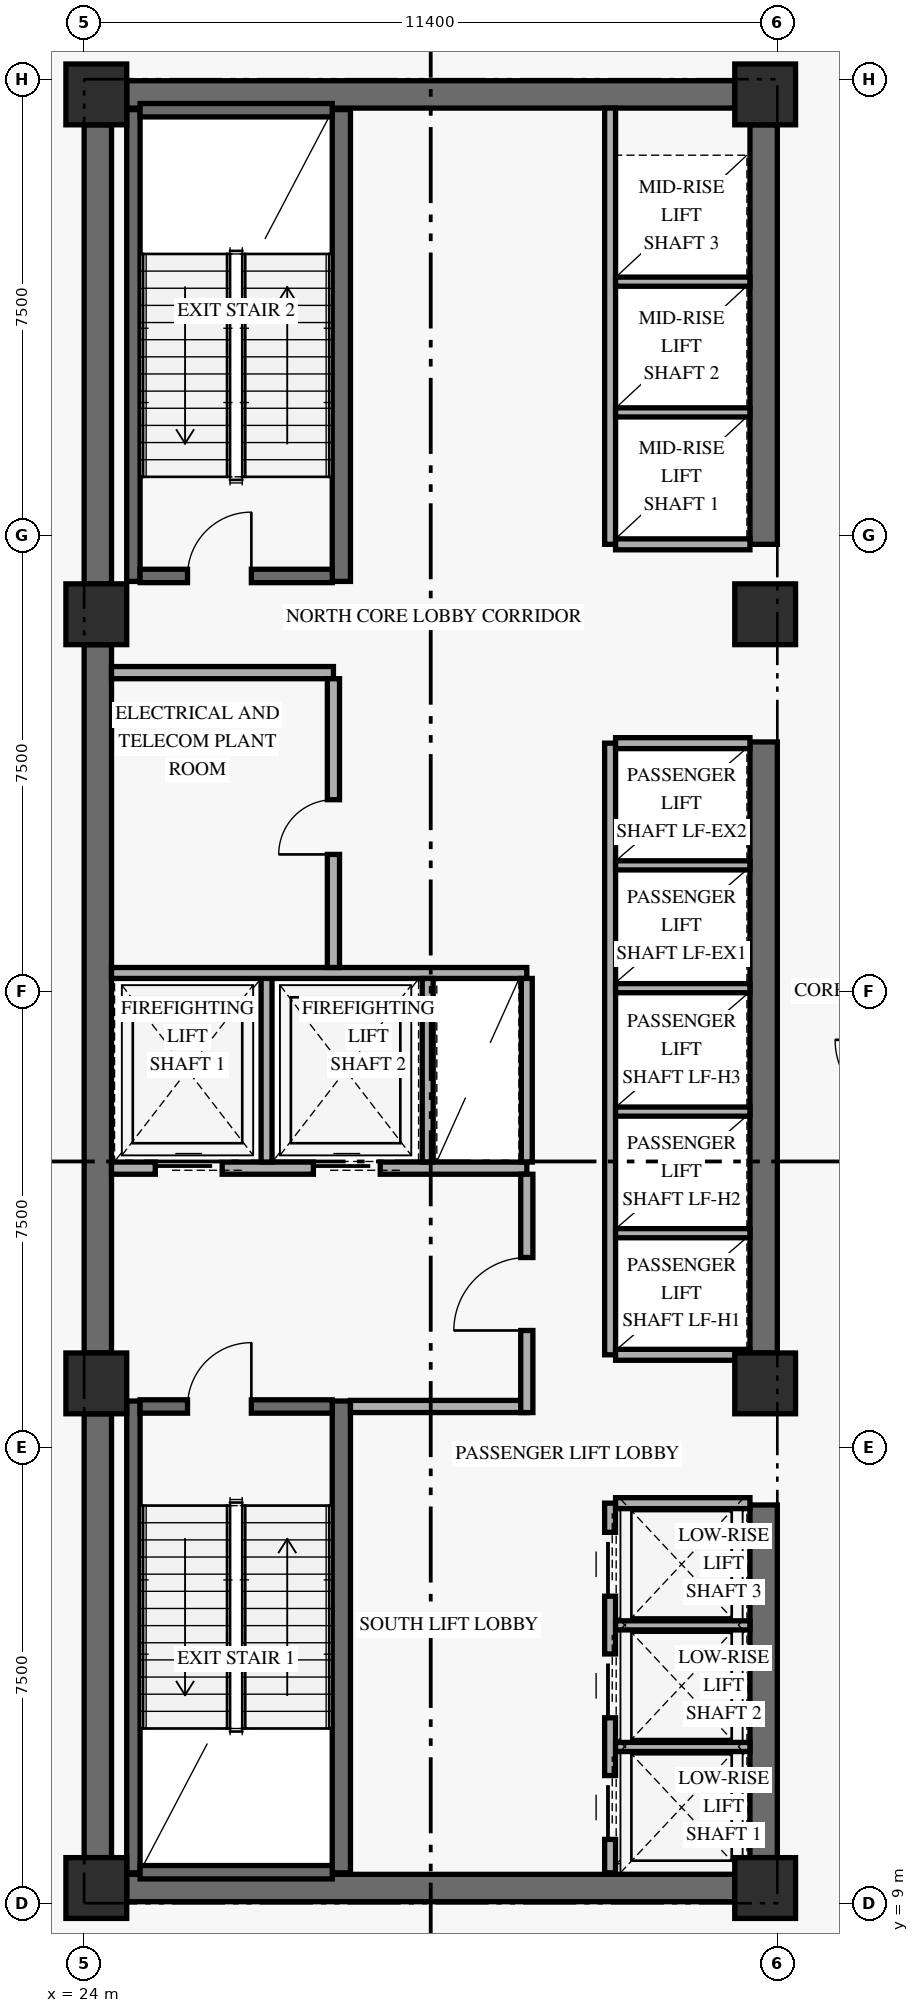
"""IFC4 building model, lengths in metres.
Left out: names, types, materials, properties, quantities, classifications, styles, units other than length and angle.
Written with IfcOpenShell. Run it as: python <this file> out.ifc"""

import sys

from ifc_helpers import new_model, si_unit, direction, frame, frame_2d, origin, origin_2d, place, context, subcontext, project, spatial, rectangle, extrude, element, fill, save


model = new_model("IFC4")
c1 = context("Model", 3, precision=1e-05, world=origin(), true_north=direction((0.0, 1.0)))
c2 = subcontext(c1, "Body", "Model", "MODEL_VIEW")
j1 = project(units=[si_unit("LENGTHUNIT", "METRE"), si_unit("PLANEANGLEUNIT", "RADIAN")], contexts=[c1])
p1 = place(None, origin())
s1 = spatial("IfcSite", under=j1, at=p1, CompositionType="ELEMENT")
p2 = place(p1, origin())
s2 = spatial("IfcBuilding", under=s1, at=p2, CompositionType="ELEMENT")
p3 = place(p2, frame((0.0, 0.0, 4.8)))
s3 = spatial("IfcBuildingStorey", under=s2, at=p3, CompositionType="ELEMENT", Elevation=4.8)
p4 = place(p3, frame((24.225, 9.75, 0.0), z_axis=(0.0, 0.0, 1.0), x_axis=(0.0, 1.0, 0.0)))
e1 = element("IfcWall", 1, at=p4, inside=s3, PredefinedType="SHEAR", context=c2, shape_type="SweptSolid", body=[
    extrude(rectangle(XDim=7.3, YDim=0.45, at=frame_2d((3.65, 0.0))), origin(), (0.0, 0.0, 1.0), 3.75),
])
p5 = place(p3, frame((24.225, 18.05, 0.0), z_axis=(0.0, 0.0, 1.0), x_axis=(0.0, 1.0, 0.0)))
e2 = element("IfcWall", 2, at=p5, inside=s3, PredefinedType="SHEAR", context=c2, shape_type="SweptSolid", body=[
    extrude(rectangle(XDim=11.65, YDim=0.45, at=frame_2d((5.825, 0.0))), origin(), (0.0, 0.0, 1.0), 3.75),
])
p6 = place(p3, frame((24.225, 30.7, 0.0), z_axis=(0.0, 0.0, 1.0), x_axis=(0.0, 1.0, 0.0)))
e3 = element("IfcWall", 3, at=p6, inside=s3, PredefinedType="SHEAR", context=c2, shape_type="SweptSolid", body=[
    extrude(rectangle(XDim=7.55, YDim=0.45, at=frame_2d((3.775, 0.0))), origin(), (0.0, 0.0, 1.0), 3.75),
])
p7 = place(p3, frame((35.175, 9.75, 0.0), z_axis=(0.0, 0.0, 1.0), x_axis=(0.0, 1.0, 0.0)))
e4 = element("IfcWall", 4, at=p7, inside=s3, PredefinedType="SHEAR", context=c2, shape_type="SweptSolid", body=[
    extrude(rectangle(XDim=5.8, YDim=0.45, at=frame_2d((2.9, 0.0))), origin(), (0.0, 0.0, 1.0), 3.75),
])
p8 = place(p3, frame((35.175, 18.05, 0.0), z_axis=(0.0, 0.0, 1.0), x_axis=(0.0, 1.0, 0.0)))
e5 = element("IfcWall", 5, at=p8, inside=s3, PredefinedType="SHEAR", context=c2, shape_type="SweptSolid", body=[
    extrude(rectangle(XDim=10.05, YDim=0.45, at=frame_2d((5.025, 0.0))), origin(), (0.0, 0.0, 1.0), 3.75),
])
p9 = place(p3, frame((35.175, 31.35, 0.0), z_axis=(0.0, 0.0, 1.0), x_axis=(0.0, 1.0, 0.0)))
e6 = element("IfcWall", 6, at=p9, inside=s3, PredefinedType="SHEAR", context=c2, shape_type="SweptSolid", body=[
    extrude(rectangle(XDim=6.9, YDim=0.45, at=frame_2d((3.45, 0.0))), origin(), (0.0, 0.0, 1.0), 3.75),
])
for number, where, z_axis, x_axis in (
    (7, (24.7, 9.25, 0.0), (0.0, 0.0, 1.0), (1.0, 0.0, 0.0)),
    (8, (24.7, 38.75, 0.0), (0.0, 0.0, 1.0), (1.0, 0.0, 0.0)),
):
    element("IfcWall", number, at=place(p3, frame(where, z_axis=z_axis, x_axis=x_axis)), inside=s3, PredefinedType="SHEAR", context=c2, shape_type="SweptSolid", body=[
        extrude(rectangle(XDim=10.0, YDim=0.45, at=frame_2d((5.0, 0.0))), origin(), (0.0, 0.0, 1.0), 4.52),
    ])
p10 = place(p3, frame((24.81, 9.5, 0.0), z_axis=(0.0, 0.0, 1.0), x_axis=(0.0, 1.0, 0.0)))
e9 = element("IfcWall", 9, at=p10, inside=s3, PredefinedType="SHEAR", context=c2, shape_type="SweptSolid", body=[
    extrude(rectangle(XDim=7.76, YDim=0.22, at=frame_2d((3.88, 0.0))), origin(), (0.0, 0.0, 1.0), 4.52),
])
p11 = place(p3, frame((28.23, 9.5, 0.0), z_axis=(0.0, 0.0, 1.0), x_axis=(0.0, 1.0, 0.0)))
e10 = element("IfcWall", 10, at=p11, inside=s3, PredefinedType="SHEAR", context=c2, shape_type="SweptSolid", body=[
    extrude(rectangle(XDim=7.76, YDim=0.3, at=frame_2d((3.88, 0.0))), origin(), (0.0, 0.0, 1.0), 4.52),
])
p12 = place(p3, frame((24.92, 9.51, 0.0), z_axis=(0.0, 0.0, 1.0), x_axis=(1.0, 0.0, 0.0)))
e11 = element("IfcWall", 11, at=p12, inside=s3, PredefinedType="SHEAR", context=c2, shape_type="SweptSolid", body=[
    extrude(rectangle(XDim=3.16, YDim=0.22, at=frame_2d((1.58, 0.0))), origin(), (0.0, 0.0, 1.0), 4.52),
])
p13 = place(p3, frame((24.92, 17.17, 0.0), z_axis=(0.0, 0.0, 1.0), x_axis=(1.0, 0.0, 0.0)))
e12 = element("IfcWall", 12, at=p13, inside=s3, PredefinedType="SHEAR", context=c2, shape_type="SweptSolid", body=[
    extrude(rectangle(XDim=3.16, YDim=0.22, at=frame_2d((1.58, 0.0))), origin(), (0.0, 0.0, 1.0), 4.52),
])
p14 = place(p13, frame((0.78, 0.0, 0.0)))
e13 = element("IfcOpeningElement", 13, at=p14, cuts=e12, PredefinedType="OPENING", context=c2, shape_type="SweptSolid", body=[
    extrude(rectangle(XDim=1.05, YDim=2.15, at=frame_2d((0.525, 1.075))), frame((0.0, 0.12, 0.0), z_axis=(0.0, -1.0, 0.0), x_axis=(1.0, 0.0, 0.0)), (0.0, 0.0, 1.0), 0.24),
])
p15 = place(p3, frame((24.81, 30.74, 0.0), z_axis=(0.0, 0.0, 1.0), x_axis=(0.0, 1.0, 0.0)))
e14 = element("IfcWall", 14, at=p15, inside=s3, PredefinedType="SHEAR", context=c2, shape_type="SweptSolid", body=[
    extrude(rectangle(XDim=7.76, YDim=0.22, at=frame_2d((3.88, 0.0))), origin(), (0.0, 0.0, 1.0), 4.52),
])
p16 = place(p3, frame((28.23, 30.74, 0.0), z_axis=(0.0, 0.0, 1.0), x_axis=(0.0, 1.0, 0.0)))
e15 = element("IfcWall", 15, at=p16, inside=s3, PredefinedType="SHEAR", context=c2, shape_type="SweptSolid", body=[
    extrude(rectangle(XDim=7.76, YDim=0.3, at=frame_2d((3.88, 0.0))), origin(), (0.0, 0.0, 1.0), 4.52),
])
p17 = place(p3, frame((24.92, 30.83, 0.0), z_axis=(0.0, 0.0, 1.0), x_axis=(1.0, 0.0, 0.0)))
e16 = element("IfcWall", 16, at=p17, inside=s3, PredefinedType="SHEAR", context=c2, shape_type="SweptSolid", body=[
    extrude(rectangle(XDim=3.16, YDim=0.22, at=frame_2d((1.58, 0.0))), origin(), (0.0, 0.0, 1.0), 4.52),
])
p18 = place(p17, frame((0.78, 0.0, 0.0)))
e17 = element("IfcOpeningElement", 17, at=p18, cuts=e16, PredefinedType="OPENING", context=c2, shape_type="SweptSolid", body=[
    extrude(rectangle(XDim=1.05, YDim=2.15, at=frame_2d((0.525, 1.075))), frame((0.0, 0.12, 0.0), z_axis=(0.0, -1.0, 0.0), x_axis=(1.0, 0.0, 0.0)), (0.0, 0.0, 1.0), 0.24),
])
p19 = place(p3, frame((24.92, 38.49, 0.0), z_axis=(0.0, 0.0, 1.0), x_axis=(1.0, 0.0, 0.0)))
e18 = element("IfcWall", 18, at=p19, inside=s3, PredefinedType="SHEAR", context=c2, shape_type="SweptSolid", body=[
    extrude(rectangle(XDim=3.16, YDim=0.22, at=frame_2d((1.58, 0.0))), origin(), (0.0, 0.0, 1.0), 4.52),
])
for number, where, z_axis, x_axis in (
    (19, (24.2, 9.25, 0.0), (0.0, 0.0, 1.0), (1.0, 0.0, 0.0)),
    (20, (24.2, 17.55, 0.0), (0.0, 0.0, 1.0), (1.0, 0.0, 0.0)),
    (21, (24.2, 30.2, 0.0), (0.0, 0.0, 1.0), (1.0, 0.0, 0.0)),
    (22, (24.2, 38.75, 0.0), (0.0, 0.0, 1.0), (1.0, 0.0, 0.0)),
    (23, (35.2, 9.25, 0.0), (0.0, 0.0, 1.0), (1.0, 0.0, 0.0)),
    (24, (35.2, 17.55, 0.0), (0.0, 0.0, 1.0), (1.0, 0.0, 0.0)),
    (25, (35.2, 30.2, 0.0), (0.0, 0.0, 1.0), (1.0, 0.0, 0.0)),
    (26, (35.2, 38.75, 0.0), (0.0, 0.0, 1.0), (1.0, 0.0, 0.0)),
):
    element("IfcColumn", number, at=place(p3, frame(where, z_axis=z_axis, x_axis=x_axis)), inside=s3, PredefinedType="COLUMN", context=c2, shape_type="SweptSolid", body=[
        extrude(rectangle(XDim=1.0, YDim=1.0, at=origin_2d()), origin(), (0.0, 0.0, 1.0), 4.8),
    ])
p20 = place(p3, frame((24.45, 21.09, 0.0), z_axis=(0.0, 0.0, 1.0), x_axis=(1.0, 0.0, 0.0)))
e27 = element("IfcWall", 27, at=p20, inside=s3, PredefinedType="STANDARD", context=c2, shape_type="SweptSolid", body=[
    extrude(rectangle(XDim=6.83, YDim=0.2, at=frame_2d((3.415, 0.0))), origin(), (0.0, 0.0, 1.0), 4.52),
])
p21 = place(p20, frame((0.72, 0.0, 0.0)))
e28 = element("IfcOpeningElement", 28, at=p21, cuts=e27, PredefinedType="OPENING", context=c2, shape_type="SweptSolid", body=[
    extrude(rectangle(XDim=1.1, YDim=2.2, at=frame_2d((0.55, 1.1))), frame((0.0, 0.11, 0.0), z_axis=(0.0, -1.0, 0.0), x_axis=(1.0, 0.0, 0.0)), (0.0, 0.0, 1.0), 0.22),
])
p22 = place(p20, frame((3.32, 0.0, 0.0)))
e29 = element("IfcOpeningElement", 29, at=p22, cuts=e27, PredefinedType="OPENING", context=c2, shape_type="SweptSolid", body=[
    extrude(rectangle(XDim=1.1, YDim=2.2, at=frame_2d((0.55, 1.1))), frame((0.0, 0.11, 0.0), z_axis=(0.0, -1.0, 0.0), x_axis=(1.0, 0.0, 0.0)), (0.0, 0.0, 1.0), 0.22),
])
p23 = place(p3, frame((28.38, 17.17, 0.0), z_axis=(0.0, 0.0, 1.0), x_axis=(1.0, 0.0, 0.0)))
e30 = element("IfcWall", 30, at=p23, inside=s3, PredefinedType="STANDARD", context=c2, shape_type="SweptSolid", body=[
    extrude(rectangle(XDim=2.9, YDim=0.2, at=frame_2d((1.45, 0.0))), origin(), (0.0, 0.0, 1.0), 4.52),
])
p24 = place(p3, frame((31.28, 17.07, 0.0), z_axis=(0.0, 0.0, 1.0), x_axis=(0.0, 1.0, 0.0)))
e31 = element("IfcWall", 31, at=p24, inside=s3, PredefinedType="STANDARD", context=c2, shape_type="SweptSolid", body=[
    extrude(rectangle(XDim=3.92, YDim=0.2, at=frame_2d((1.96, 0.0))), origin(), (0.0, 0.0, 1.0), 3.502),
])
p25 = place(p24, frame((1.35, 0.0, 0.0)))
e32 = element("IfcOpeningElement", 32, at=p25, cuts=e31, PredefinedType="OPENING", context=c2, shape_type="SweptSolid", body=[
    extrude(rectangle(XDim=1.2, YDim=2.15, at=frame_2d((0.6, 1.075))), frame((0.0, 0.11, 0.0), z_axis=(0.0, -1.0, 0.0), x_axis=(1.0, 0.0, 0.0)), (0.0, 0.0, 1.0), 0.22),
])
p26 = place(p3, frame((27.0, 21.19, 0.0), z_axis=(0.0, 0.0, 1.0), x_axis=(0.0, 1.0, 0.0)))
e33 = element("IfcWall", 33, at=p26, inside=s3, PredefinedType="STANDARD", context=c2, shape_type="SweptSolid", body=[
    extrude(rectangle(XDim=3.11, YDim=0.18, at=frame_2d((1.555, 0.0))), origin(), (0.0, 0.0, 1.0), 4.52),
])
p27 = place(p3, frame((24.45, 24.3, 0.0), z_axis=(0.0, 0.0, 1.0), x_axis=(1.0, 0.0, 0.0)))
e34 = element("IfcWall", 34, at=p27, inside=s3, PredefinedType="STANDARD", context=c2, shape_type="SweptSolid", body=[
    extrude(rectangle(XDim=6.83, YDim=0.18, at=frame_2d((3.415, 0.0))), origin(), (0.0, 0.0, 1.0), 4.52),
])
for number, where, z_axis, x_axis in (
    (35, (29.65, 21.19, 0.0), (0.0, 0.0, 1.0), (0.0, 1.0, 0.0)),
    (36, (31.28, 21.19, 0.0), (0.0, 0.0, 1.0), (0.0, 1.0, 0.0)),
):
    element("IfcWall", number, at=place(p3, frame(where, z_axis=z_axis, x_axis=x_axis)), inside=s3, PredefinedType="STANDARD", context=c2, shape_type="SweptSolid", body=[
        extrude(rectangle(XDim=3.02, YDim=0.18, at=frame_2d((1.51, 0.0))), origin(), (0.0, 0.0, 1.0), 4.52),
    ])
p28 = place(p3, frame((24.45, 29.24, 0.0), z_axis=(0.0, 0.0, 1.0), x_axis=(1.0, 0.0, 0.0)))
e37 = element("IfcWall", 37, at=p28, inside=s3, PredefinedType="STANDARD", context=c2, shape_type="SweptSolid", body=[
    extrude(rectangle(XDim=3.65, YDim=0.2, at=frame_2d((1.825, 0.0))), origin(), (0.0, 0.0, 1.0), 4.52),
])
p29 = place(p3, frame((28.1, 24.39, 0.0), z_axis=(0.0, 0.0, 1.0), x_axis=(0.0, 1.0, 0.0)))
e38 = element("IfcWall", 38, at=p29, inside=s3, PredefinedType="STANDARD", context=c2, shape_type="SweptSolid", body=[
    extrude(rectangle(XDim=4.75, YDim=0.2, at=frame_2d((2.375, 0.0))), origin(), (0.0, 0.0, 1.0), 4.52),
])
p30 = place(p29, frame((1.86, 0.0, 0.0)))
e39 = element("IfcOpeningElement", 39, at=p30, cuts=e38, PredefinedType="OPENING", context=c2, shape_type="SweptSolid", body=[
    extrude(rectangle(XDim=0.9, YDim=2.1, at=frame_2d((0.45, 1.05))), frame((0.0, 0.11, 0.0), z_axis=(0.0, -1.0, 0.0), x_axis=(1.0, 0.0, 0.0)), (0.0, 0.0, 1.0), 0.22),
])
p31 = place(p3, frame((32.65, 9.5, 0.0), z_axis=(0.0, 0.0, 1.0), x_axis=(0.0, 1.0, 0.0)))
e40 = element("IfcWall", 40, at=p31, inside=s3, PredefinedType="STANDARD", context=c2, shape_type="SweptSolid", body=[
    extrude(rectangle(XDim=6.08, YDim=0.18, at=frame_2d((3.04, 0.0))), origin(), (0.0, 0.0, 1.0), 4.52),
])
p32 = place(p31, frame((0.55, 0.0, 0.0)))
e41 = element("IfcOpeningElement", 41, at=p32, cuts=e40, PredefinedType="OPENING", context=c2, shape_type="SweptSolid", body=[
    extrude(rectangle(XDim=1.05, YDim=2.2, at=frame_2d((0.525, 1.1))), frame((0.0, 0.1, 0.0), z_axis=(0.0, -1.0, 0.0), x_axis=(1.0, 0.0, 0.0)), (0.0, 0.0, 1.0), 0.2),
])
p33 = place(p31, frame((2.55, 0.0, 0.0)))
e42 = element("IfcOpeningElement", 42, at=p33, cuts=e40, PredefinedType="OPENING", context=c2, shape_type="SweptSolid", body=[
    extrude(rectangle(XDim=1.05, YDim=2.2, at=frame_2d((0.525, 1.1))), frame((0.0, 0.1, 0.0), z_axis=(0.0, -1.0, 0.0), x_axis=(1.0, 0.0, 0.0)), (0.0, 0.0, 1.0), 0.2),
])
p34 = place(p31, frame((4.55, 0.0, 0.0)))
e43 = element("IfcOpeningElement", 43, at=p34, cuts=e40, PredefinedType="OPENING", context=c2, shape_type="SweptSolid", body=[
    extrude(rectangle(XDim=1.05, YDim=2.2, at=frame_2d((0.525, 1.1))), frame((0.0, 0.1, 0.0), z_axis=(0.0, -1.0, 0.0), x_axis=(1.0, 0.0, 0.0)), (0.0, 0.0, 1.0), 0.2),
])
p35 = place(p3, frame((32.74, 15.58, 0.0), z_axis=(0.0, 0.0, 1.0), x_axis=(1.0, 0.0, 0.0)))
e44 = element("IfcWall", 44, at=p35, inside=s3, PredefinedType="STANDARD", context=c2, shape_type="SweptSolid", body=[
    extrude(rectangle(XDim=2.21, YDim=0.18, at=frame_2d((1.105, 0.0))), origin(), (0.0, 0.0, 1.0), 4.52),
])
for number, where, z_axis, x_axis in (
    (45, (32.74, 11.57, 0.0), (0.0, 0.0, 1.0), (1.0, 0.0, 0.0)),
    (46, (32.74, 13.57, 0.0), (0.0, 0.0, 1.0), (1.0, 0.0, 0.0)),
):
    element("IfcWall", number, at=place(p3, frame(where, z_axis=z_axis, x_axis=x_axis)), inside=s3, PredefinedType="STANDARD", context=c2, shape_type="SweptSolid", body=[
        extrude(rectangle(XDim=2.21, YDim=0.15, at=frame_2d((1.105, 0.0))), origin(), (0.0, 0.0, 1.0), 4.52),
    ])
p36 = place(p3, frame((32.65, 18.02, 0.0), z_axis=(0.0, 0.0, 1.0), x_axis=(0.0, 1.0, 0.0)))
e47 = element("IfcWall", 47, at=p36, inside=s3, PredefinedType="STANDARD", context=c2, shape_type="SweptSolid", body=[
    extrude(rectangle(XDim=10.06, YDim=0.18, at=frame_2d((5.03, 0.0))), origin(), (0.0, 0.0, 1.0), 4.52),
])
for number, where, z_axis, x_axis in (
    (48, (32.74, 18.02, 0.0), (0.0, 0.0, 1.0), (1.0, 0.0, 0.0)),
    (49, (32.74, 28.08, 0.0), (0.0, 0.0, 1.0), (1.0, 0.0, 0.0)),
):
    element("IfcWall", number, at=place(p3, frame(where, z_axis=z_axis, x_axis=x_axis)), inside=s3, PredefinedType="STANDARD", context=c2, shape_type="SweptSolid", body=[
        extrude(rectangle(XDim=2.21, YDim=0.18, at=frame_2d((1.105, 0.0))), origin(), (0.0, 0.0, 1.0), 4.52),
    ])
for number, where, z_axis, x_axis in (
    (50, (32.74, 20.02, 0.0), (0.0, 0.0, 1.0), (1.0, 0.0, 0.0)),
    (51, (32.74, 22.02, 0.0), (0.0, 0.0, 1.0), (1.0, 0.0, 0.0)),
    (52, (32.74, 24.05, 0.0), (0.0, 0.0, 1.0), (1.0, 0.0, 0.0)),
    (53, (32.74, 26.07, 0.0), (0.0, 0.0, 1.0), (1.0, 0.0, 0.0)),
):
    element("IfcWall", number, at=place(p3, frame(where, z_axis=z_axis, x_axis=x_axis)), inside=s3, PredefinedType="STANDARD", context=c2, shape_type="SweptSolid", body=[
        extrude(rectangle(XDim=2.21, YDim=0.15, at=frame_2d((1.105, 0.0))), origin(), (0.0, 0.0, 1.0), 4.52),
    ])
p37 = place(p3, frame((32.65, 31.35, 0.0), z_axis=(0.0, 0.0, 1.0), x_axis=(0.0, 1.0, 0.0)))
e54 = element("IfcWall", 54, at=p37, inside=s3, PredefinedType="STANDARD", context=c2, shape_type="SweptSolid", body=[
    extrude(rectangle(XDim=7.175, YDim=0.18, at=frame_2d((3.587, 0.0))), origin(), (0.0, 0.0, 1.0), 4.52),
])
p38 = place(p3, frame((32.74, 31.35, 0.0), z_axis=(0.0, 0.0, 1.0), x_axis=(1.0, 0.0, 0.0)))
e55 = element("IfcWall", 55, at=p38, inside=s3, PredefinedType="STANDARD", context=c2, shape_type="SweptSolid", body=[
    extrude(rectangle(XDim=2.21, YDim=0.18, at=frame_2d((1.105, 0.0))), origin(), (0.0, 0.0, 1.0), 4.52),
])
for number, where, z_axis, x_axis in (
    (56, (32.74, 33.52, 0.0), (0.0, 0.0, 1.0), (1.0, 0.0, 0.0)),
    (57, (32.74, 35.67, 0.0), (0.0, 0.0, 1.0), (1.0, 0.0, 0.0)),
):
    element("IfcWall", number, at=place(p3, frame(where, z_axis=z_axis, x_axis=x_axis)), inside=s3, PredefinedType="STANDARD", context=c2, shape_type="SweptSolid", body=[
        extrude(rectangle(XDim=2.21, YDim=0.15, at=frame_2d((1.105, 0.0))), origin(), (0.0, 0.0, 1.0), 4.52),
    ])
p39 = place(p14, frame((1.05, 0.0, 0.0), z_axis=(0.0, 0.0, 1.0), x_axis=(-1.0, 0.0, 0.0)))
e58 = element("IfcDoor", 58, at=p39, inside=s3, OperationType="SINGLE_SWING_LEFT", PredefinedType="DOOR", context=c2, shape_type="SweptSolid", body=[
    extrude(rectangle(XDim=1.05, YDim=2.15, at=frame_2d((0.525, 1.075))), frame((0.0, 0.025, 0.0), z_axis=(0.0, -1.0, 0.0), x_axis=(1.0, 0.0, 0.0)), (0.0, 0.0, 1.0), 0.05),
])
fill(e13, e58)
p40 = place(p18, origin())
e59 = element("IfcDoor", 59, at=p40, inside=s3, OperationType="SINGLE_SWING_RIGHT", PredefinedType="DOOR", context=c2, shape_type="SweptSolid", body=[
    extrude(rectangle(XDim=1.05, YDim=2.15, at=frame_2d((0.525, 1.075))), frame((0.0, 0.025, 0.0), z_axis=(0.0, -1.0, 0.0), x_axis=(1.0, 0.0, 0.0)), (0.0, 0.0, 1.0), 0.05),
])
fill(e17, e59)
p41 = place(p21, origin())
e60 = element("IfcDoor", 60, at=p41, inside=s3, OperationType="SLIDING_TO_LEFT", PredefinedType="DOOR", context=c2, shape_type="SweptSolid", body=[
    extrude(rectangle(XDim=1.1, YDim=2.2, at=frame_2d((0.55, 1.1))), frame((0.0, 0.025, 0.0), z_axis=(0.0, -1.0, 0.0), x_axis=(1.0, 0.0, 0.0)), (0.0, 0.0, 1.0), 0.05),
])
fill(e28, e60)
p42 = place(p22, origin())
e61 = element("IfcDoor", 61, at=p42, inside=s3, OperationType="SLIDING_TO_LEFT", PredefinedType="DOOR", context=c2, shape_type="SweptSolid", body=[
    extrude(rectangle(XDim=1.1, YDim=2.2, at=frame_2d((0.55, 1.1))), frame((0.0, 0.025, 0.0), z_axis=(0.0, -1.0, 0.0), x_axis=(1.0, 0.0, 0.0)), (0.0, 0.0, 1.0), 0.05),
])
fill(e29, e61)
p43 = place(p25, origin())
e62 = element("IfcDoor", 62, at=p43, inside=s3, OperationType="SINGLE_SWING_LEFT", PredefinedType="DOOR", context=c2, shape_type="SweptSolid", body=[
    extrude(rectangle(XDim=1.2, YDim=2.15, at=frame_2d((0.6, 1.075))), frame((0.0, 0.025, 0.0), z_axis=(0.0, -1.0, 0.0), x_axis=(1.0, 0.0, 0.0)), (0.0, 0.0, 1.0), 0.05),
])
fill(e32, e62)
p44 = place(p30, origin())
e63 = element("IfcDoor", 63, at=p44, inside=s3, OperationType="SINGLE_SWING_LEFT", PredefinedType="DOOR", context=c2, shape_type="SweptSolid", body=[
    extrude(rectangle(XDim=0.9, YDim=2.1, at=frame_2d((0.45, 1.05))), frame((0.0, 0.025, 0.0), z_axis=(0.0, -1.0, 0.0), x_axis=(1.0, 0.0, 0.0)), (0.0, 0.0, 1.0), 0.05),
])
fill(e39, e63)
p45 = place(p32, origin())
e64 = element("IfcDoor", 64, at=p45, inside=s3, OperationType="SLIDING_TO_LEFT", PredefinedType="DOOR", context=c2, shape_type="SweptSolid", body=[
    extrude(rectangle(XDim=1.05, YDim=2.2, at=frame_2d((0.525, 1.1))), frame((0.0, 0.025, 0.0), z_axis=(0.0, -1.0, 0.0), x_axis=(1.0, 0.0, 0.0)), (0.0, 0.0, 1.0), 0.05),
])
fill(e41, e64)
p46 = place(p33, origin())
e65 = element("IfcDoor", 65, at=p46, inside=s3, OperationType="SLIDING_TO_LEFT", PredefinedType="DOOR", context=c2, shape_type="SweptSolid", body=[
    extrude(rectangle(XDim=1.05, YDim=2.2, at=frame_2d((0.525, 1.1))), frame((0.0, 0.025, 0.0), z_axis=(0.0, -1.0, 0.0), x_axis=(1.0, 0.0, 0.0)), (0.0, 0.0, 1.0), 0.05),
])
fill(e42, e65)
p47 = place(p34, origin())
e66 = element("IfcDoor", 66, at=p47, inside=s3, OperationType="SLIDING_TO_LEFT", PredefinedType="DOOR", context=c2, shape_type="SweptSolid", body=[
    extrude(rectangle(XDim=1.05, YDim=2.2, at=frame_2d((0.525, 1.1))), frame((0.0, 0.025, 0.0), z_axis=(0.0, -1.0, 0.0), x_axis=(1.0, 0.0, 0.0)), (0.0, 0.0, 1.0), 0.05),
])
fill(e43, e66)
save(model, sys.argv[1])
